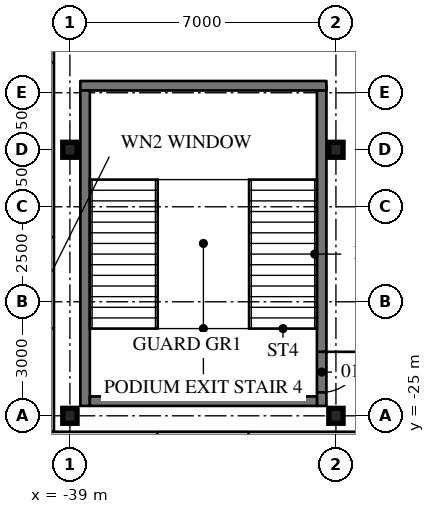
"""IFC4 building model, lengths in metres.
Left out: names, types, materials, properties, quantities, classifications, styles, units other than length and angle.
Written with IfcOpenShell. Run it as: python <this file> out.ifc"""

import sys

from ifc_helpers import new_model, si_unit, direction, frame, frame_2d, origin, origin_2d, place, context, subcontext, project, spatial, rectangle, i_section, extrude, element, fill, save


model = new_model("IFC4")
c1 = context("Model", 3, precision=1e-05, world=origin(), true_north=direction((0.0, 1.0)))
c2 = subcontext(c1, "Body", "Model", "MODEL_VIEW")
j1 = project(units=[si_unit("LENGTHUNIT", "METRE"), si_unit("PLANEANGLEUNIT", "RADIAN")], contexts=[c1])
p1 = place(None, origin())
s1 = spatial("IfcSite", under=j1, at=p1, CompositionType="ELEMENT")
p2 = place(p1, origin())
s2 = spatial("IfcBuilding", under=s1, at=p2, CompositionType="ELEMENT")
p3 = place(p2, frame((0.0, 0.0, 6.0)))
s3 = spatial("IfcBuildingStorey", under=s2, at=p3, CompositionType="ELEMENT", Elevation=6.0)
for number, where, z_axis, x_axis in (
    (1, (-39.0, -25.0, 0.0), (0.0, 0.0, 1.0), (0.0, 1.0, 0.0)),
    (2, (-39.0, -18.0, 0.0), (0.0, 0.0, 1.0), (0.0, 1.0, 0.0)),
    (3, (-32.0, -25.0, 0.0), (0.0, 0.0, 1.0), (0.0, 1.0, 0.0)),
    (4, (-32.0, -18.0, 0.0), (0.0, 0.0, 1.0), (0.0, 1.0, 0.0)),
):
    element("IfcColumn", number, at=place(p3, frame(where, z_axis=z_axis, x_axis=x_axis)), inside=s3, PredefinedType="COLUMN", context=c2, shape_type="SweptSolid", body=[
        extrude(i_section(OverallWidth=0.394, OverallDepth=0.376, WebThickness=0.017, FlangeThickness=0.028, at=origin_2d()), origin(), (0.0, 0.0, 1.0), 5.0),
    ])
p4 = place(p3, frame((-39.82, -25.62, -0.19), z_axis=(0.0, 0.0, 1.0), x_axis=(1.0, 0.0, 0.0)))
e5 = element("IfcWall", 5, at=p4, inside=s3, PredefinedType="SOLIDWALL", context=c2, shape_type="SweptSolid", body=[
    extrude(rectangle(XDim=79.64, YDim=0.4, at=frame_2d((39.82, 0.0))), origin(), (0.0, 0.0, 1.0), 5.0),
])
p5 = place(p4, frame((3.12, 0.0, 1.09)))
e6 = element("IfcOpeningElement", 6, at=p5, cuts=e5, PredefinedType="OPENING", context=c2, shape_type="SweptSolid", body=[
    extrude(rectangle(XDim=2.4, YDim=2.7, at=frame_2d((1.2, 1.35))), frame((0.0, 0.21, 0.0), z_axis=(0.0, -1.0, 0.0), x_axis=(1.0, 0.0, 0.0)), (0.0, 0.0, 1.0), 0.42),
])
p6 = place(p4, frame((10.12, 0.0, 1.09)))
e7 = element("IfcOpeningElement", 7, at=p6, cuts=e5, PredefinedType="OPENING", context=c2, shape_type="SweptSolid", body=[
    extrude(rectangle(XDim=2.4, YDim=2.7, at=frame_2d((1.2, 1.35))), frame((0.0, 0.21, 0.0), z_axis=(0.0, -1.0, 0.0), x_axis=(1.0, 0.0, 0.0)), (0.0, 0.0, 1.0), 0.42),
])
p7 = place(p4, frame((17.12, 0.0, 1.09)))
e8 = element("IfcOpeningElement", 8, at=p7, cuts=e5, PredefinedType="OPENING", context=c2, shape_type="SweptSolid", body=[
    extrude(rectangle(XDim=2.4, YDim=2.7, at=frame_2d((1.2, 1.35))), frame((0.0, 0.21, 0.0), z_axis=(0.0, -1.0, 0.0), x_axis=(1.0, 0.0, 0.0)), (0.0, 0.0, 1.0), 0.42),
])
p8 = place(p4, frame((24.12, 0.0, 1.09)))
e9 = element("IfcOpeningElement", 9, at=p8, cuts=e5, PredefinedType="OPENING", context=c2, shape_type="SweptSolid", body=[
    extrude(rectangle(XDim=2.4, YDim=2.7, at=frame_2d((1.2, 1.35))), frame((0.0, 0.21, 0.0), z_axis=(0.0, -1.0, 0.0), x_axis=(1.0, 0.0, 0.0)), (0.0, 0.0, 1.0), 0.42),
])
p9 = place(p4, frame((33.12, 0.0, 1.09)))
e10 = element("IfcOpeningElement", 10, at=p9, cuts=e5, PredefinedType="OPENING", context=c2, shape_type="SweptSolid", body=[
    extrude(rectangle(XDim=2.4, YDim=2.7, at=frame_2d((1.2, 1.35))), frame((0.0, 0.21, 0.0), z_axis=(0.0, -1.0, 0.0), x_axis=(1.0, 0.0, 0.0)), (0.0, 0.0, 1.0), 0.42),
])
p10 = place(p4, frame((44.12, 0.0, 1.09)))
e11 = element("IfcOpeningElement", 11, at=p10, cuts=e5, PredefinedType="OPENING", context=c2, shape_type="SweptSolid", body=[
    extrude(rectangle(XDim=2.4, YDim=2.7, at=frame_2d((1.2, 1.35))), frame((0.0, 0.21, 0.0), z_axis=(0.0, -1.0, 0.0), x_axis=(1.0, 0.0, 0.0)), (0.0, 0.0, 1.0), 0.42),
])
p11 = place(p4, frame((53.12, 0.0, 1.09)))
e12 = element("IfcOpeningElement", 12, at=p11, cuts=e5, PredefinedType="OPENING", context=c2, shape_type="SweptSolid", body=[
    extrude(rectangle(XDim=2.4, YDim=2.7, at=frame_2d((1.2, 1.35))), frame((0.0, 0.21, 0.0), z_axis=(0.0, -1.0, 0.0), x_axis=(1.0, 0.0, 0.0)), (0.0, 0.0, 1.0), 0.42),
])
p12 = place(p4, frame((60.12, 0.0, 1.09)))
e13 = element("IfcOpeningElement", 13, at=p12, cuts=e5, PredefinedType="OPENING", context=c2, shape_type="SweptSolid", body=[
    extrude(rectangle(XDim=2.4, YDim=2.7, at=frame_2d((1.2, 1.35))), frame((0.0, 0.21, 0.0), z_axis=(0.0, -1.0, 0.0), x_axis=(1.0, 0.0, 0.0)), (0.0, 0.0, 1.0), 0.42),
])
p13 = place(p4, frame((67.12, 0.0, 1.09)))
e14 = element("IfcOpeningElement", 14, at=p13, cuts=e5, PredefinedType="OPENING", context=c2, shape_type="SweptSolid", body=[
    extrude(rectangle(XDim=2.4, YDim=2.7, at=frame_2d((1.2, 1.35))), frame((0.0, 0.21, 0.0), z_axis=(0.0, -1.0, 0.0), x_axis=(1.0, 0.0, 0.0)), (0.0, 0.0, 1.0), 0.42),
])
p14 = place(p4, frame((74.12, 0.0, 1.09)))
e15 = element("IfcOpeningElement", 15, at=p14, cuts=e5, PredefinedType="OPENING", context=c2, shape_type="SweptSolid", body=[
    extrude(rectangle(XDim=2.4, YDim=2.7, at=frame_2d((1.2, 1.35))), frame((0.0, 0.21, 0.0), z_axis=(0.0, -1.0, 0.0), x_axis=(1.0, 0.0, 0.0)), (0.0, 0.0, 1.0), 0.42),
])
p15 = place(p3, frame((-39.62, 25.42, -0.19), z_axis=(0.0, 0.0, 1.0), x_axis=(0.0, -1.0, 0.0)))
e16 = element("IfcWall", 16, at=p15, inside=s3, PredefinedType="SOLIDWALL", context=c2, shape_type="SweptSolid", body=[
    extrude(rectangle(XDim=50.84, YDim=0.4, at=frame_2d((25.42, 0.0))), origin(), (0.0, 0.0, 1.0), 5.0),
])
p16 = place(p15, frame((45.72, 0.0, 1.09)))
e17 = element("IfcOpeningElement", 17, at=p16, cuts=e16, PredefinedType="OPENING", context=c2, shape_type="SweptSolid", body=[
    extrude(rectangle(XDim=2.4, YDim=2.7, at=frame_2d((1.2, 1.35))), frame((0.0, 0.21, 0.0), z_axis=(0.0, -1.0, 0.0), x_axis=(1.0, 0.0, 0.0)), (0.0, 0.0, 1.0), 0.42),
])
p17 = place(p15, frame((38.72, 0.0, 1.09)))
e18 = element("IfcOpeningElement", 18, at=p17, cuts=e16, PredefinedType="OPENING", context=c2, shape_type="SweptSolid", body=[
    extrude(rectangle(XDim=2.4, YDim=2.7, at=frame_2d((1.2, 1.35))), frame((0.0, 0.21, 0.0), z_axis=(0.0, -1.0, 0.0), x_axis=(1.0, 0.0, 0.0)), (0.0, 0.0, 1.0), 0.42),
])
p18 = place(p15, frame((29.72, 0.0, 1.09)))
e19 = element("IfcOpeningElement", 19, at=p18, cuts=e16, PredefinedType="OPENING", context=c2, shape_type="SweptSolid", body=[
    extrude(rectangle(XDim=2.4, YDim=2.7, at=frame_2d((1.2, 1.35))), frame((0.0, 0.21, 0.0), z_axis=(0.0, -1.0, 0.0), x_axis=(1.0, 0.0, 0.0)), (0.0, 0.0, 1.0), 0.42),
])
p19 = place(p15, frame((18.72, 0.0, 1.09)))
e20 = element("IfcOpeningElement", 20, at=p19, cuts=e16, PredefinedType="OPENING", context=c2, shape_type="SweptSolid", body=[
    extrude(rectangle(XDim=2.4, YDim=2.7, at=frame_2d((1.2, 1.35))), frame((0.0, 0.21, 0.0), z_axis=(0.0, -1.0, 0.0), x_axis=(1.0, 0.0, 0.0)), (0.0, 0.0, 1.0), 0.42),
])
p20 = place(p15, frame((9.72, 0.0, 1.09)))
e21 = element("IfcOpeningElement", 21, at=p20, cuts=e16, PredefinedType="OPENING", context=c2, shape_type="SweptSolid", body=[
    extrude(rectangle(XDim=2.4, YDim=2.7, at=frame_2d((1.2, 1.35))), frame((0.0, 0.21, 0.0), z_axis=(0.0, -1.0, 0.0), x_axis=(1.0, 0.0, 0.0)), (0.0, 0.0, 1.0), 0.42),
])
p21 = place(p15, frame((2.72, 0.0, 1.09)))
e22 = element("IfcOpeningElement", 22, at=p21, cuts=e16, PredefinedType="OPENING", context=c2, shape_type="SweptSolid", body=[
    extrude(rectangle(XDim=2.4, YDim=2.7, at=frame_2d((1.2, 1.35))), frame((0.0, 0.21, 0.0), z_axis=(0.0, -1.0, 0.0), x_axis=(1.0, 0.0, 0.0)), (0.0, 0.0, 1.0), 0.42),
])
p22 = place(p3, frame((-32.375, -16.315, 0.0), z_axis=(0.0, 0.0, 1.0), x_axis=(0.0, -1.0, 0.0)))
e23 = element("IfcWall", 23, at=p22, inside=s3, PredefinedType="SOLIDWALL", context=c2, shape_type="SweptSolid", body=[
    extrude(rectangle(XDim=8.425, YDim=0.25, at=frame_2d((4.212, 0.0))), origin(), (0.0, 0.0, 1.0), 4.81),
])
p23 = place(p22, frame((7.001, 0.0, 0.0)))
e24 = element("IfcOpeningElement", 24, at=p23, cuts=e23, PredefinedType="OPENING", context=c2, shape_type="SweptSolid", body=[
    extrude(rectangle(XDim=1.067, YDim=2.134, at=frame_2d((0.533, 1.067))), frame((0.0, 0.135, 0.0), z_axis=(0.0, -1.0, 0.0), x_axis=(1.0, 0.0, 0.0)), (0.0, 0.0, 1.0), 0.27),
])
p24 = place(p3, frame((-32.25, -16.315, 0.0), z_axis=(0.0, 0.0, 1.0), x_axis=(-1.0, 0.0, 0.0)))
e25 = element("IfcWall", 25, at=p24, inside=s3, PredefinedType="SOLIDWALL", context=c2, shape_type="SweptSolid", body=[
    extrude(rectangle(XDim=6.475, YDim=0.25, at=frame_2d((3.238, 0.0))), origin(), (0.0, 0.0, 1.0), 4.81),
])
p25 = place(p3, frame((-38.6, -16.44, 0.0), z_axis=(0.0, 0.0, 1.0), x_axis=(0.0, -1.0, 0.0)))
e26 = element("IfcWall", 26, at=p25, inside=s3, PredefinedType="SOLIDWALL", context=c2, shape_type="SweptSolid", body=[
    extrude(rectangle(XDim=8.3, YDim=0.25, at=frame_2d((4.15, 0.0))), origin(), (0.0, 0.0, 1.0), 4.81),
])
p26 = place(p3, frame((-32.5, -24.615, 0.0), z_axis=(0.0, 0.0, 1.0), x_axis=(-1.0, 0.0, 0.0)))
e27 = element("IfcWall", 27, at=p26, inside=s3, PredefinedType="SOLIDWALL", context=c2, shape_type="SweptSolid", body=[
    extrude(rectangle(XDim=5.975, YDim=0.25, at=frame_2d((2.988, 0.0))), origin(), (0.0, 0.0, 1.0), 4.81),
])
p27 = place(p23, origin())
e28 = element("IfcDoor", 28, at=p27, inside=s3, OperationType="SINGLE_SWING_LEFT", PredefinedType="DOOR", context=c2, shape_type="SweptSolid", body=[
    extrude(rectangle(XDim=1.067, YDim=2.134, at=frame_2d((0.533, 1.067))), frame((0.0, 0.025, 0.0), z_axis=(0.0, -1.0, 0.0), x_axis=(1.0, 0.0, 0.0)), (0.0, 0.0, 1.0), 0.05),
])
fill(e24, e28)
save(model, sys.argv[1])
